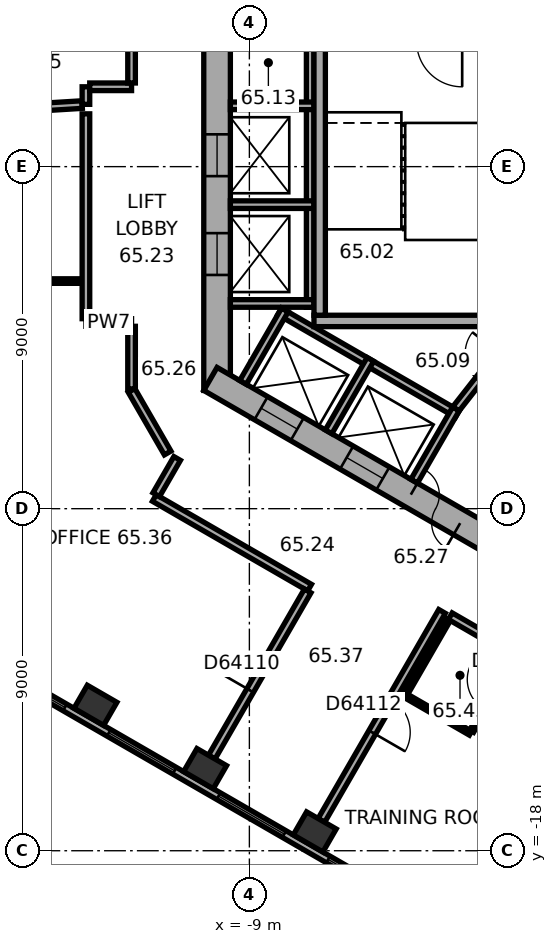
"""IFC4 building model, lengths in metres.
Left out: names, types, materials, properties, quantities, classifications, styles, units other than length and angle.
Written with IfcOpenShell. Run it as: python <this file> out.ifc"""

import sys

from ifc_helpers import new_model, si_unit, direction, frame, frame_2d, origin, origin_2d, place, context, subcontext, project, spatial, rectangle, extrude, element, fill, save


model = new_model("IFC4")
c1 = context("Model", 3, precision=1e-05, world=origin(), true_north=direction((0.0, 1.0)))
c2 = subcontext(c1, "Body", "Model", "MODEL_VIEW")
j1 = project(units=[si_unit("LENGTHUNIT", "METRE"), si_unit("PLANEANGLEUNIT", "RADIAN")], contexts=[c1])
p1 = place(None, origin())
s1 = spatial("IfcSite", under=j1, at=p1, CompositionType="ELEMENT")
p2 = place(p1, origin())
s2 = spatial("IfcBuilding", under=s1, at=p2, CompositionType="ELEMENT")
p3 = place(p2, frame((0.0, 0.0, 263.5)))
s3 = spatial("IfcBuildingStorey", under=s2, at=p3, CompositionType="ELEMENT", Elevation=263.5)
for number, where, z_axis, x_axis in (
    (1, (-13.05, -14.174, 0.0), (0.0, 0.0, 1.0), (0.866, -0.5, 0.0)),
    (2, (-10.165, -15.84, 0.0), (0.0, 0.0, 1.0), (0.866, -0.5, 0.0)),
    (3, (-7.28, -17.505, 0.0), (0.0, 0.0, 1.0), (0.866, -0.5, 0.0)),
):
    element("IfcColumn", number, at=place(p3, frame(where, z_axis=z_axis, x_axis=x_axis)), inside=s3, PredefinedType="COLUMN", context=c2, shape_type="SweptSolid", body=[
        extrude(rectangle(XDim=0.9, YDim=0.7, at=origin_2d()), origin(), (0.0, 0.0, 1.0), 3.7),
    ])
p4 = place(p3, frame((-9.85, 5.889, 0.0), z_axis=(0.0, 0.0, 1.0), x_axis=(0.0, -1.0, 0.0)))
e4 = element("IfcWall", 4, at=p4, inside=s3, PredefinedType="SHEAR", context=c2, shape_type="SweptSolid", body=[
    extrude(rectangle(XDim=11.778, YDim=0.7, at=frame_2d((5.889, 0.0))), origin(), (0.0, 0.0, 1.0), 3.7),
])
p5 = place(p4, frame((5.039, 0.0, 0.0)))
e5 = element("IfcOpeningElement", 5, at=p5, cuts=e4, PredefinedType="OPENING", context=c2, shape_type="SweptSolid", body=[
    extrude(rectangle(XDim=1.1, YDim=2.1, at=frame_2d((0.55, 1.05))), frame((0.0, 0.36, 0.0), z_axis=(0.0, -1.0, 0.0), x_axis=(1.0, 0.0, 0.0)), (0.0, 0.0, 1.0), 0.72),
])
p6 = place(p4, frame((7.639, 0.0, 0.0)))
e6 = element("IfcOpeningElement", 6, at=p6, cuts=e4, PredefinedType="OPENING", context=c2, shape_type="SweptSolid", body=[
    extrude(rectangle(XDim=1.1, YDim=2.1, at=frame_2d((0.55, 1.05))), frame((0.0, 0.36, 0.0), z_axis=(0.0, -1.0, 0.0), x_axis=(1.0, 0.0, 0.0)), (0.0, 0.0, 1.0), 0.72),
])
p7 = place(p3, frame((-10.025, -5.586, 0.0), z_axis=(0.0, 0.0, 1.0), x_axis=(0.866026453023, -0.499998182661, 0.0)))
e7 = element("IfcWall", 7, at=p7, inside=s3, PredefinedType="SHEAR", context=c2, shape_type="SweptSolid", body=[
    extrude(rectangle(XDim=11.778, YDim=0.7, at=frame_2d((5.889, 0.0))), origin(), (0.0, 0.0, 1.0), 3.7),
])
p8 = place(p7, frame((6.089, 0.0, 0.0)))
e8 = element("IfcOpeningElement", 8, at=p8, cuts=e7, PredefinedType="OPENING", context=c2, shape_type="SweptSolid", body=[
    extrude(rectangle(XDim=1.5, YDim=2.1, at=frame_2d((0.75, 1.05))), frame((0.0, 0.36, 0.0), z_axis=(0.0, -1.0, 0.0), x_axis=(1.0, 0.0, 0.0)), (0.0, 0.0, 1.0), 0.72),
])
p9 = place(p7, frame((1.539, 0.0, 0.0)))
e9 = element("IfcOpeningElement", 9, at=p9, cuts=e7, PredefinedType="OPENING", context=c2, shape_type="SweptSolid", body=[
    extrude(rectangle(XDim=1.1, YDim=2.1, at=frame_2d((0.55, 1.05))), frame((0.0, 0.36, 0.0), z_axis=(0.0, -1.0, 0.0), x_axis=(1.0, 0.0, 0.0)), (0.0, 0.0, 1.0), 0.72),
])
p10 = place(p7, frame((4.139, 0.0, 0.0)))
e10 = element("IfcOpeningElement", 10, at=p10, cuts=e7, PredefinedType="OPENING", context=c2, shape_type="SweptSolid", body=[
    extrude(rectangle(XDim=1.1, YDim=2.1, at=frame_2d((0.55, 1.05))), frame((0.0, 0.36, 0.0), z_axis=(0.0, -1.0, 0.0), x_axis=(1.0, 0.0, 0.0)), (0.0, 0.0, 1.0), 0.72),
])
p11 = place(p3, frame((-16.626, -12.629, 0.0), z_axis=(0.0, 0.0, 1.0), x_axis=(0.866026460444, -0.499998169808, 0.0)))
e11 = element("IfcWall", 11, at=p11, inside=s3, PredefinedType="STANDARD", context=c2, shape_type="SweptSolid", body=[
    extrude(rectangle(XDim=17.731, YDim=0.2, at=frame_2d((8.866, 0.0))), origin(), (0.0, 0.0, 1.0), 3.7),
])
p12 = place(p11, frame((1.203, 0.0, 0.9)))
e12 = element("IfcOpeningElement", 12, at=p12, cuts=e11, PredefinedType="OPENING", context=c2, shape_type="SweptSolid", body=[
    extrude(rectangle(XDim=2.0, YDim=2.0, at=frame_2d((1.0, 1.0))), frame((0.0, 0.11, 0.0), z_axis=(0.0, -1.0, 0.0), x_axis=(1.0, 0.0, 0.0)), (0.0, 0.0, 1.0), 0.22),
])
p13 = place(p11, frame((4.535, 0.0, 0.9)))
e13 = element("IfcOpeningElement", 13, at=p13, cuts=e11, PredefinedType="OPENING", context=c2, shape_type="SweptSolid", body=[
    extrude(rectangle(XDim=2.0, YDim=2.0, at=frame_2d((1.0, 1.0))), frame((0.0, 0.11, 0.0), z_axis=(0.0, -1.0, 0.0), x_axis=(1.0, 0.0, 0.0)), (0.0, 0.0, 1.0), 0.22),
])
p14 = place(p11, frame((7.867, 0.0, 0.9)))
e14 = element("IfcOpeningElement", 14, at=p14, cuts=e11, PredefinedType="OPENING", context=c2, shape_type="SweptSolid", body=[
    extrude(rectangle(XDim=2.0, YDim=2.0, at=frame_2d((1.0, 1.0))), frame((0.0, 0.11, 0.0), z_axis=(0.0, -1.0, 0.0), x_axis=(1.0, 0.0, 0.0)), (0.0, 0.0, 1.0), 0.22),
])
p15 = place(p11, frame((11.198, 0.0, 0.9)))
e15 = element("IfcOpeningElement", 15, at=p15, cuts=e11, PredefinedType="OPENING", context=c2, shape_type="SweptSolid", body=[
    extrude(rectangle(XDim=2.0, YDim=2.0, at=frame_2d((1.0, 1.0))), frame((0.0, 0.11, 0.0), z_axis=(0.0, -1.0, 0.0), x_axis=(1.0, 0.0, 0.0)), (0.0, 0.0, 1.0), 0.22),
])
p16 = place(p11, frame((14.53, 0.0, 0.9)))
e16 = element("IfcOpeningElement", 16, at=p16, cuts=e11, PredefinedType="OPENING", context=c2, shape_type="SweptSolid", body=[
    extrude(rectangle(XDim=2.0, YDim=2.0, at=frame_2d((1.0, 1.0))), frame((0.0, 0.11, 0.0), z_axis=(0.0, -1.0, 0.0), x_axis=(1.0, 0.0, 0.0)), (0.0, 0.0, 1.0), 0.22),
])
p17 = place(p3, frame((-7.4, 4.3, 0.0), z_axis=(0.0, 0.0, 1.0), x_axis=(0.0, -1.0, 0.0)))
e17 = element("IfcWall", 17, at=p17, inside=s3, PredefinedType="PARTITIONING", context=c2, shape_type="SweptSolid", body=[
    extrude(rectangle(XDim=8.0, YDim=0.2, at=frame_2d((4.0, 0.0))), origin(), (0.0, 0.0, 1.0), 3.42),
])
for number, where, z_axis, x_axis in (
    (18, (-7.3, 1.6, 0.0), (0.0, 0.0, 1.0), (-1.0, 0.0, 0.0)),
    (19, (-7.3, -1.0, 0.0), (0.0, 0.0, 1.0), (-1.0, 0.0, 0.0)),
    (20, (-7.3, -3.6, 0.0), (0.0, 0.0, 1.0), (-1.0, 0.0, 0.0)),
):
    element("IfcWall", number, at=place(p3, frame(where, z_axis=z_axis, x_axis=x_axis)), inside=s3, PredefinedType="PARTITIONING", context=c2, shape_type="SweptSolid", body=[
        extrude(rectangle(XDim=2.2, YDim=0.2, at=frame_2d((1.1, 0.0))), origin(), (0.0, 0.0, 1.0), 3.42),
    ])
p18 = place(p3, frame((-8.203, -3.809, 0.0), z_axis=(0.0, 0.0, 1.0), x_axis=(0.866028230842, -0.499995103361, 0.0)))
e21 = element("IfcWall", 21, at=p18, inside=s3, PredefinedType="PARTITIONING", context=c2, shape_type="SweptSolid", body=[
    extrude(rectangle(XDim=5.4, YDim=0.2, at=frame_2d((2.7, 0.0))), origin(), (0.0, 0.0, 1.0), 3.42),
])
for number, where, z_axis, x_axis in (
    (22, (-8.067, -3.772, 0.0), (0.0, 0.0, 1.0), (-0.5, -0.866, 0.0)),
    (23, (-5.815, -5.072, 0.0), (0.0, 0.0, 1.0), (-0.5, -0.866, 0.0)),
):
    element("IfcWall", number, at=place(p3, frame(where, z_axis=z_axis, x_axis=x_axis)), inside=s3, PredefinedType="PARTITIONING", context=c2, shape_type="SweptSolid", body=[
        extrude(rectangle(XDim=2.2, YDim=0.2, at=frame_2d((1.1, 0.0))), origin(), (0.0, 0.0, 1.0), 3.42),
    ])
p19 = place(p3, frame((-3.563, -6.372, 0.0), z_axis=(0.0, 0.0, 1.0), x_axis=(-0.499994660107, -0.866028486751, 0.0)))
e24 = element("IfcWall", 24, at=p19, inside=s3, PredefinedType="PARTITIONING", context=c2, shape_type="SweptSolid", body=[
    extrude(rectangle(XDim=2.2, YDim=0.2, at=frame_2d((1.1, 0.0))), origin(), (0.0, 0.0, 1.0), 3.42),
])
p20 = place(p3, frame((-2.6, -4.06, 0.0), z_axis=(0.0, 0.0, 1.0), x_axis=(-1.0, 0.0, 0.0)))
e25 = element("IfcWall", 25, at=p20, inside=s3, PredefinedType="SHEAR", context=c2, shape_type="SweptSolid", body=[
    extrude(rectangle(XDim=4.7, YDim=0.3, at=frame_2d((2.35, 0.0))), origin(), (0.0, 0.0, 1.0), 3.42),
])
p21 = place(p3, frame((-7.15, 3.15, 0.0), z_axis=(0.0, 0.0, 1.0), x_axis=(0.0, -1.0, 0.0)))
e26 = element("IfcWall", 26, at=p21, inside=s3, PredefinedType="SHEAR", context=c2, shape_type="SweptSolid", body=[
    extrude(rectangle(XDim=7.06, YDim=0.3, at=frame_2d((3.53, 0.0))), origin(), (0.0, 0.0, 1.0), 3.42),
])
p22 = place(p3, frame((-1.712, -4.008, 0.0), z_axis=(0.0, 0.0, 1.0), x_axis=(-0.616549420702, -0.787316208287, 0.0)))
e27 = element("IfcWall", 27, at=p22, inside=s3, PredefinedType="PARTITIONING", context=c2, shape_type="SweptSolid", body=[
    extrude(rectangle(XDim=3.002, YDim=0.2, at=frame_2d((1.501, 0.0))), origin(), (0.0, 0.0, 1.0), 3.42),
])
p23 = place(p22, frame((1.15, 0.0, 0.0)))
e28 = element("IfcOpeningElement", 28, at=p23, cuts=e27, PredefinedType="OPENING", context=c2, shape_type="SweptSolid", body=[
    extrude(rectangle(XDim=0.9, YDim=2.1, at=frame_2d((0.45, 1.05))), frame((0.0, 0.11, 0.0), z_axis=(0.0, -1.0, 0.0), x_axis=(1.0, 0.0, 0.0)), (0.0, 0.0, 1.0), 0.22),
])
p24 = place(p3, frame((-18.565, 1.317, 0.0), z_axis=(0.0, 0.0, 1.0), x_axis=(0.998136844425, 0.061015078472, 0.0)))
e29 = element("IfcWall", 29, at=p24, inside=s3, PredefinedType="PARTITIONING", context=c2, shape_type="SweptSolid", body=[
    extrude(rectangle(XDim=5.174, YDim=0.2, at=frame_2d((2.587, 0.0))), origin(), (0.0, 0.0, 1.0), 2.87),
])
p25 = place(p3, frame((-13.401, -3.011, 0.0), z_axis=(0.0, 0.0, 1.0), x_axis=(-1.0, 0.0, 0.0)))
e30 = element("IfcWall", 30, at=p25, inside=s3, PredefinedType="PARTITIONING", context=c2, shape_type="SweptSolid", body=[
    extrude(rectangle(XDim=3.84, YDim=0.12, at=frame_2d((1.92, 0.0))), origin(), (0.0, 0.0, 1.0), 3.42),
])
p26 = place(p3, frame((-13.301, -4.101, 0.0), z_axis=(0.0, 0.0, 1.0), x_axis=(1.0, 0.0, 0.0)))
e31 = element("IfcWall", 31, at=p26, inside=s3, PredefinedType="PARTITIONING", context=c2, shape_type="SweptSolid", body=[
    extrude(rectangle(XDim=1.201, YDim=0.2, at=frame_2d((0.601, 0.0))), origin(), (0.0, 0.0, 1.0), 3.42),
])
p27 = place(p3, frame((-13.301, 1.389, 0.0), z_axis=(0.0, 0.0, 1.0), x_axis=(0.0, -1.0, 0.0)))
e32 = element("IfcWall", 32, at=p27, inside=s3, PredefinedType="PARTITIONING", context=c2, shape_type="SweptSolid", body=[
    extrude(rectangle(XDim=5.39, YDim=0.2, at=frame_2d((2.695, 0.0))), origin(), (0.0, 0.0, 1.0), 3.42),
])
p28 = place(p3, frame((-13.301, 2.101, 0.0), z_axis=(0.0, 0.0, 1.0), x_axis=(0.0, -1.0, 0.0)))
e33 = element("IfcWall", 33, at=p28, inside=s3, PredefinedType="PARTITIONING", context=c2, shape_type="SweptSolid", body=[
    extrude(rectangle(XDim=0.462, YDim=0.2, at=frame_2d((0.231, 0.0))), origin(), (0.0, 0.0, 1.0), 3.42),
])
p29 = place(p3, frame((-12.1, -5.889, 0.0), z_axis=(0.0, 0.0, 1.0), x_axis=(0.500063520245, -0.865988727248, 0.0)))
e34 = element("IfcWall", 34, at=p29, inside=s3, PredefinedType="PARTITIONING", context=c2, shape_type="SweptSolid", body=[
    extrude(rectangle(XDim=1.9, YDim=0.2, at=frame_2d((0.95, 0.0))), origin(), (0.0, 0.0, 1.0), 3.42),
])
p30 = place(p3, frame((-12.1, -4.201, 0.0), z_axis=(0.0, 0.0, 1.0), x_axis=(0.0, -1.0, 0.0)))
e35 = element("IfcWall", 35, at=p30, inside=s3, PredefinedType="PARTITIONING", context=c2, shape_type="SweptSolid", body=[
    extrude(rectangle(XDim=1.648, YDim=0.2, at=frame_2d((0.824, 0.0))), origin(), (0.0, 0.0, 1.0), 3.42),
])
p31 = place(p3, frame((-12.1, 2.101, 0.0), z_axis=(0.0, 0.0, 1.0), x_axis=(-1.0, 0.0, 0.0)))
e36 = element("IfcWall", 36, at=p31, inside=s3, PredefinedType="PARTITIONING", context=c2, shape_type="SweptSolid", body=[
    extrude(rectangle(XDim=1.101, YDim=0.2, at=frame_2d((0.55, 0.0))), origin(), (0.0, 0.0, 1.0), 3.42),
])
p32 = place(p3, frame((-12.1, 5.889, 0.0), z_axis=(0.0, 0.0, 1.0), x_axis=(0.0, -1.0, 0.0)))
e37 = element("IfcWall", 37, at=p32, inside=s3, PredefinedType="PARTITIONING", context=c2, shape_type="SweptSolid", body=[
    extrude(rectangle(XDim=3.688, YDim=0.2, at=frame_2d((1.844, 0.0))), origin(), (0.0, 0.0, 1.0), 3.42),
])
p33 = place(p32, frame((1.763, 0.0, 0.0)))
e38 = element("IfcOpeningElement", 38, at=p33, cuts=e37, PredefinedType="OPENING", context=c2, shape_type="SweptSolid", body=[
    extrude(rectangle(XDim=1.0, YDim=2.1, at=frame_2d((0.5, 1.05))), frame((0.0, 0.11, 0.0), z_axis=(0.0, -1.0, 0.0), x_axis=(1.0, 0.0, 0.0)), (0.0, 0.0, 1.0), 0.22),
])
p34 = place(p3, frame((-11.501, -8.719, 0.0), z_axis=(0.0, 0.0, 1.0), x_axis=(0.866024434742, -0.500001678427, 0.0)))
e39 = element("IfcWall", 39, at=p34, inside=s3, PredefinedType="PARTITIONING", context=c2, shape_type="SweptSolid", body=[
    extrude(rectangle(XDim=4.718, YDim=0.2, at=frame_2d((2.359, 0.0))), origin(), (0.0, 0.0, 1.0), 3.42),
])
p35 = place(p3, frame((-10.901, -7.678, 0.0), z_axis=(0.0, 0.0, 1.0), x_axis=(-0.500074377092, -0.865982457891, 0.0)))
e40 = element("IfcWall", 40, at=p35, inside=s3, PredefinedType="PARTITIONING", context=c2, shape_type="SweptSolid", body=[
    extrude(rectangle(XDim=1.101, YDim=0.2, at=frame_2d((0.55, 0.0))), origin(), (0.0, 0.0, 1.0), 3.42),
])
p36 = place(p3, frame((-9.99, -15.537, 0.0), z_axis=(0.0, 0.0, 1.0), x_axis=(0.499966611936, 0.866044679534, 0.0)))
e41 = element("IfcWall", 41, at=p36, inside=s3, PredefinedType="PARTITIONING", context=c2, shape_type="SweptSolid", body=[
    extrude(rectangle(XDim=5.049, YDim=0.2, at=frame_2d((2.524, 0.0))), origin(), (0.0, 0.0, 1.0), 2.87),
])
p37 = place(p36, frame((2.024, 0.0, 0.0)))
e42 = element("IfcOpeningElement", 42, at=p37, cuts=e41, PredefinedType="OPENING", context=c2, shape_type="SweptSolid", body=[
    extrude(rectangle(XDim=1.0, YDim=2.1, at=frame_2d((0.5, 1.05))), frame((0.0, 0.11, 0.0), z_axis=(0.0, -1.0, 0.0), x_axis=(1.0, 0.0, 0.0)), (0.0, 0.0, 1.0), 0.22),
])
p38 = place(p3, frame((-7.105, -17.202, 0.0), z_axis=(0.0, 0.0, 1.0), x_axis=(0.499988692146, 0.866031932279, 0.0)))
e43 = element("IfcWall", 43, at=p38, inside=s3, PredefinedType="PARTITIONING", context=c2, shape_type="SweptSolid", body=[
    extrude(rectangle(XDim=6.35, YDim=0.2, at=frame_2d((3.175, 0.0))), origin(), (0.0, 0.0, 1.0), 3.42),
])
p39 = place(p38, frame((2.675, 0.0, 0.0)))
e44 = element("IfcOpeningElement", 44, at=p39, cuts=e43, PredefinedType="OPENING", context=c2, shape_type="SweptSolid", body=[
    extrude(rectangle(XDim=1.0, YDim=2.1, at=frame_2d((0.5, 1.05))), frame((0.0, 0.11, 0.0), z_axis=(0.0, -1.0, 0.0), x_axis=(1.0, 0.0, 0.0)), (0.0, 0.0, 1.0), 0.22),
])
p40 = place(p3, frame((-4.913, -13.906, 0.0), z_axis=(0.0, 0.0, 1.0), x_axis=(0.500031774688, 0.866007057882, 0.0)))
e45 = element("IfcWall", 45, at=p40, inside=s3, PredefinedType="PARTITIONING", context=c2, shape_type="SweptSolid", body=[
    extrude(rectangle(XDim=2.3, YDim=0.12, at=frame_2d((1.15, 0.0))), origin(), (0.0, 0.0, 1.0), 3.42),
])
p41 = place(p3, frame((-3.713, -11.828, 0.0), z_axis=(0.0, 0.0, 1.0), x_axis=(0.866026321388, -0.499998410661, 0.0)))
e46 = element("IfcWall", 46, at=p41, inside=s3, PredefinedType="PARTITIONING", context=c2, shape_type="SweptSolid", body=[
    extrude(rectangle(XDim=3.191, YDim=0.2, at=frame_2d((1.595, 0.0))), origin(), (0.0, 0.0, 1.0), 3.42),
])
p42 = place(p3, frame((-3.181, -14.906, 0.0), z_axis=(0.0, 0.0, 1.0), x_axis=(-0.866043088465, 0.499969367985, 0.0)))
e47 = element("IfcWall", 47, at=p42, inside=s3, PredefinedType="PARTITIONING", context=c2, shape_type="SweptSolid", body=[
    extrude(rectangle(XDim=1.94, YDim=0.12, at=frame_2d((0.97, 0.0))), origin(), (0.0, 0.0, 1.0), 3.42),
])
p43 = place(p3, frame((-2.031, -12.915, 0.0), z_axis=(0.0, 0.0, 1.0), x_axis=(-0.49994888933, -0.866054910533, 0.0)))
e48 = element("IfcWall", 48, at=p43, inside=s3, PredefinedType="PARTITIONING", context=c2, shape_type="SweptSolid", body=[
    extrude(rectangle(XDim=2.24, YDim=0.12, at=frame_2d((1.12, 0.0))), origin(), (0.0, 0.0, 1.0), 3.42),
])
p44 = place(p43, frame((0.67, 0.0, 0.0)))
e49 = element("IfcOpeningElement", 49, at=p44, cuts=e48, PredefinedType="OPENING", context=c2, shape_type="SweptSolid", body=[
    extrude(rectangle(XDim=0.9, YDim=2.1, at=frame_2d((0.45, 1.05))), frame((0.0, 0.07, 0.0), z_axis=(0.0, -1.0, 0.0), x_axis=(1.0, 0.0, 0.0)), (0.0, 0.0, 1.0), 0.14),
])
p45 = place(p12, origin())
e50 = element("IfcWindow", 50, at=p45, inside=s3, PartitioningType="SINGLE_PANEL", PredefinedType="WINDOW", context=c2, shape_type="SweptSolid", body=[
    extrude(rectangle(XDim=2.0, YDim=2.0, at=frame_2d((1.0, 1.0))), frame((0.0, 0.03, 0.0), z_axis=(0.0, -1.0, 0.0), x_axis=(1.0, 0.0, 0.0)), (0.0, 0.0, 1.0), 0.06),
])
fill(e12, e50)
p46 = place(p13, origin())
e51 = element("IfcWindow", 51, at=p46, inside=s3, PartitioningType="SINGLE_PANEL", PredefinedType="WINDOW", context=c2, shape_type="SweptSolid", body=[
    extrude(rectangle(XDim=2.0, YDim=2.0, at=frame_2d((1.0, 1.0))), frame((0.0, 0.03, 0.0), z_axis=(0.0, -1.0, 0.0), x_axis=(1.0, 0.0, 0.0)), (0.0, 0.0, 1.0), 0.06),
])
fill(e13, e51)
p47 = place(p14, origin())
e52 = element("IfcWindow", 52, at=p47, inside=s3, PartitioningType="SINGLE_PANEL", PredefinedType="WINDOW", context=c2, shape_type="SweptSolid", body=[
    extrude(rectangle(XDim=2.0, YDim=2.0, at=frame_2d((1.0, 1.0))), frame((0.0, 0.03, 0.0), z_axis=(0.0, -1.0, 0.0), x_axis=(1.0, 0.0, 0.0)), (0.0, 0.0, 1.0), 0.06),
])
fill(e14, e52)
p48 = place(p15, origin())
e53 = element("IfcWindow", 53, at=p48, inside=s3, PartitioningType="SINGLE_PANEL", PredefinedType="WINDOW", context=c2, shape_type="SweptSolid", body=[
    extrude(rectangle(XDim=2.0, YDim=2.0, at=frame_2d((1.0, 1.0))), frame((0.0, 0.03, 0.0), z_axis=(0.0, -1.0, 0.0), x_axis=(1.0, 0.0, 0.0)), (0.0, 0.0, 1.0), 0.06),
])
fill(e15, e53)
p49 = place(p8, origin())
e54 = element("IfcDoor", 54, at=p49, inside=s3, OperationType="DOUBLE_DOOR_SINGLE_SWING", PredefinedType="DOOR", context=c2, shape_type="SweptSolid", body=[
    extrude(rectangle(XDim=1.5, YDim=2.1, at=frame_2d((0.75, 1.05))), frame((0.0, 0.025, 0.0), z_axis=(0.0, -1.0, 0.0), x_axis=(1.0, 0.0, 0.0)), (0.0, 0.0, 1.0), 0.05),
])
fill(e8, e54)
p50 = place(p5, origin())
e55 = element("IfcDoor", 55, at=p50, inside=s3, OperationType="DOUBLE_DOOR_SLIDING", PredefinedType="DOOR", context=c2, shape_type="SweptSolid", body=[
    extrude(rectangle(XDim=1.1, YDim=2.1, at=frame_2d((0.55, 1.05))), frame((0.0, 0.025, 0.0), z_axis=(0.0, -1.0, 0.0), x_axis=(1.0, 0.0, 0.0)), (0.0, 0.0, 1.0), 0.05),
])
fill(e5, e55)
p51 = place(p6, origin())
e56 = element("IfcDoor", 56, at=p51, inside=s3, OperationType="DOUBLE_DOOR_SLIDING", PredefinedType="DOOR", context=c2, shape_type="SweptSolid", body=[
    extrude(rectangle(XDim=1.1, YDim=2.1, at=frame_2d((0.55, 1.05))), frame((0.0, 0.025, 0.0), z_axis=(0.0, -1.0, 0.0), x_axis=(1.0, 0.0, 0.0)), (0.0, 0.0, 1.0), 0.05),
])
fill(e6, e56)
p52 = place(p9, origin())
e57 = element("IfcDoor", 57, at=p52, inside=s3, OperationType="DOUBLE_DOOR_SLIDING", PredefinedType="DOOR", context=c2, shape_type="SweptSolid", body=[
    extrude(rectangle(XDim=1.1, YDim=2.1, at=frame_2d((0.55, 1.05))), frame((0.0, 0.025, 0.0), z_axis=(0.0, -1.0, 0.0), x_axis=(1.0, 0.0, 0.0)), (0.0, 0.0, 1.0), 0.05),
])
fill(e9, e57)
p53 = place(p10, origin())
e58 = element("IfcDoor", 58, at=p53, inside=s3, OperationType="DOUBLE_DOOR_SLIDING", PredefinedType="DOOR", context=c2, shape_type="SweptSolid", body=[
    extrude(rectangle(XDim=1.1, YDim=2.1, at=frame_2d((0.55, 1.05))), frame((0.0, 0.025, 0.0), z_axis=(0.0, -1.0, 0.0), x_axis=(1.0, 0.0, 0.0)), (0.0, 0.0, 1.0), 0.05),
])
fill(e10, e58)
p54 = place(p37, origin())
e59 = element("IfcDoor", 59, at=p54, inside=s3, OperationType="SINGLE_SWING_LEFT", PredefinedType="DOOR", context=c2, shape_type="SweptSolid", body=[
    extrude(rectangle(XDim=1.0, YDim=2.1, at=frame_2d((0.5, 1.05))), frame((0.0, 0.025, 0.0), z_axis=(0.0, -1.0, 0.0), x_axis=(1.0, 0.0, 0.0)), (0.0, 0.0, 1.0), 0.05),
])
fill(e42, e59)
p55 = place(p39, origin())
e60 = element("IfcDoor", 60, at=p55, inside=s3, OperationType="SINGLE_SWING_LEFT", PredefinedType="DOOR", context=c2, shape_type="SweptSolid", body=[
    extrude(rectangle(XDim=1.0, YDim=2.1, at=frame_2d((0.5, 1.05))), frame((0.0, 0.025, 0.0), z_axis=(0.0, -1.0, 0.0), x_axis=(1.0, 0.0, 0.0)), (0.0, 0.0, 1.0), 0.05),
])
fill(e44, e60)
save(model, sys.argv[1])
